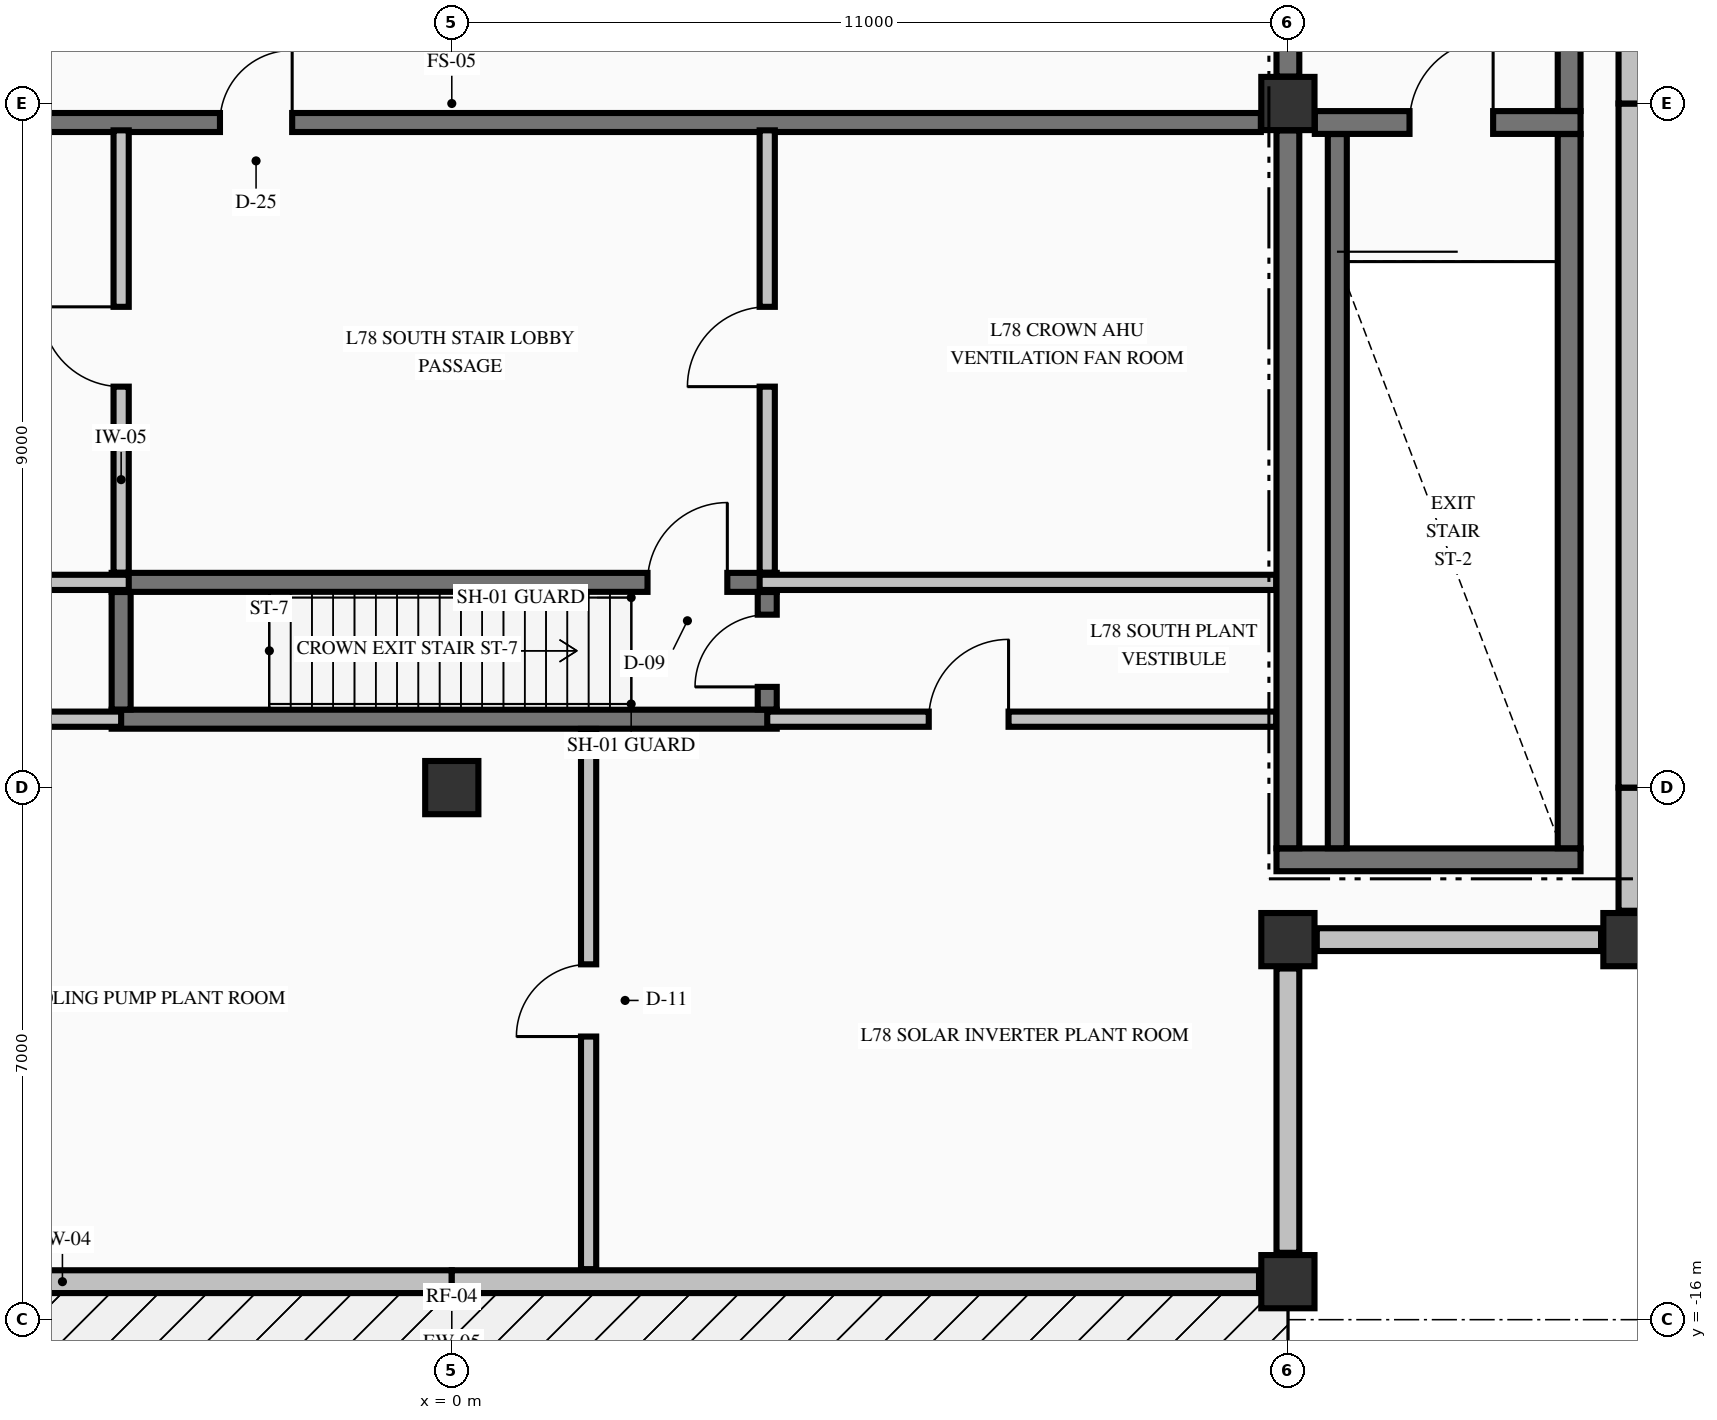
"""IFC4 building model, lengths in metres.
Left out: names, types, materials, properties, quantities, classifications, styles, units other than length and angle.
Written with IfcOpenShell. Run it as: python <this file> out.ifc"""

import sys

from ifc_helpers import new_model, si_unit, direction, frame, frame_2d, origin, origin_2d, place, context, subcontext, project, spatial, rectangle, extrude, element, fill, save


model = new_model("IFC4")
c1 = context("Model", 3, precision=1e-05, world=origin(), true_north=direction((0.0, 1.0)))
c2 = subcontext(c1, "Body", "Model", "MODEL_VIEW")
j1 = project(units=[si_unit("LENGTHUNIT", "METRE"), si_unit("PLANEANGLEUNIT", "RADIAN")], contexts=[c1])
p1 = place(None, origin())
s1 = spatial("IfcSite", under=j1, at=p1, CompositionType="ELEMENT")
p2 = place(p1, origin())
s2 = spatial("IfcBuilding", under=s1, at=p2, CompositionType="ELEMENT")
p3 = place(p2, frame((0.0, 0.0, 290.98)))
s3 = spatial("IfcBuildingStorey", under=s2, at=p3, CompositionType="ELEMENT", Elevation=290.98)
for number, where, z_axis, x_axis in (
    (1, (11.0, -15.5, -0.325), (0.0, 0.0, 1.0), (1.0, 0.0, 0.0)),
    (2, (15.5, -11.0, -0.325), (0.0, 0.0, 1.0), (1.0, 0.0, 0.0)),
    (3, (11.0, -11.0, -0.325), (0.0, 0.0, 1.0), (1.0, 0.0, 0.0)),
    (4, (11.0, 0.0, -0.325), (0.0, 0.0, 1.0), (1.0, 0.0, 0.0)),
    (5, (0.0, -9.0, -0.325), (0.0, 0.0, 1.0), (1.0, 0.0, 0.0)),
):
    element("IfcColumn", number, at=place(p3, frame(where, z_axis=z_axis, x_axis=x_axis)), inside=s3, PredefinedType="COLUMN", context=c2, shape_type="SweptSolid", body=[
        extrude(rectangle(XDim=0.7, YDim=0.7, at=origin_2d()), origin(), (0.0, 0.0, 1.0), 3.06),
    ])
for number, where, z_axis, x_axis in (
    (6, (-10.62, -15.5, 0.0), (0.0, 0.0, 1.0), (1.0, 0.0, 0.0)),
    (7, (0.0, -15.5, 0.0), (0.0, 0.0, 1.0), (1.0, 0.0, 0.0)),
):
    element("IfcWall", number, at=place(p3, frame(where, z_axis=z_axis, x_axis=x_axis)), inside=s3, PredefinedType="STANDARD", context=c2, shape_type="SweptSolid", body=[
        extrude(rectangle(XDim=10.62, YDim=0.3, at=frame_2d((5.31, 0.0))), origin(), (0.0, 0.0, 1.0), 2.127),
    ])
p4 = place(p3, frame((15.5, -10.62, 0.0), z_axis=(0.0, 0.0, 1.0), x_axis=(0.0, 1.0, 0.0)))
e8 = element("IfcWall", 8, at=p4, inside=s3, PredefinedType="STANDARD", context=c2, shape_type="SweptSolid", body=[
    extrude(rectangle(XDim=1.62, YDim=0.3, at=frame_2d((0.81, 0.0))), origin(), (0.0, 0.0, 1.0), 2.127),
])
for number, where, z_axis, x_axis in (
    (9, (15.5, -9.0, 0.0), (0.0, 0.0, 1.0), (0.0, 1.0, 0.0)),
    (10, (15.5, 0.0, 0.0), (0.0, 0.0, 1.0), (0.0, 1.0, 0.0)),
):
    element("IfcWall", number, at=place(p3, frame(where, z_axis=z_axis, x_axis=x_axis)), inside=s3, PredefinedType="STANDARD", context=c2, shape_type="SweptSolid", body=[
        extrude(rectangle(XDim=9.0, YDim=0.3, at=frame_2d((4.5, 0.0))), origin(), (0.0, 0.0, 1.0), 2.127),
    ])
p5 = place(p3, frame((11.0, -15.12, 0.0), z_axis=(0.0, 0.0, 1.0), x_axis=(0.0, 1.0, 0.0)))
e11 = element("IfcWall", 11, at=p5, inside=s3, PredefinedType="STANDARD", context=c2, shape_type="SweptSolid", body=[
    extrude(rectangle(XDim=3.74, YDim=0.3, at=frame_2d((1.87, 0.0))), origin(), (0.0, 0.0, 1.0), 0.927),
])
p6 = place(p3, frame((11.38, -11.0, 0.0), z_axis=(0.0, 0.0, 1.0), x_axis=(1.0, 0.0, 0.0)))
e12 = element("IfcWall", 12, at=p6, inside=s3, PredefinedType="STANDARD", context=c2, shape_type="SweptSolid", body=[
    extrude(rectangle(XDim=3.74, YDim=0.3, at=frame_2d((1.87, 0.0))), origin(), (0.0, 0.0, 1.0), 1.077),
])
p7 = place(p3, frame((10.85, -9.95, 0.0), z_axis=(0.0, 0.0, 1.0), x_axis=(1.0, 0.0, 0.0)))
e13 = element("IfcWall", 13, at=p7, inside=s3, PredefinedType="SHEAR", context=c2, shape_type="SweptSolid", body=[
    extrude(rectangle(XDim=4.0, YDim=0.3, at=frame_2d((2.0, 0.0))), origin(), (0.0, 0.0, 1.0), 2.735),
])
p8 = place(p3, frame((-4.475, -8.1, 0.0), z_axis=(0.0, 0.0, 1.0), x_axis=(1.0, 0.0, 0.0)))
e14 = element("IfcWall", 14, at=p8, inside=s3, PredefinedType="SOLIDWALL", context=c2, shape_type="SweptSolid", body=[
    extrude(rectangle(XDim=8.75, YDim=0.25, at=frame_2d((4.375, 0.0))), origin(), (0.0, 0.0, 1.0), 2.735),
])
p9 = place(p3, frame((-4.475, -6.3, 0.0), z_axis=(0.0, 0.0, 1.0), x_axis=(1.0, 0.0, 0.0)))
e15 = element("IfcWall", 15, at=p9, inside=s3, PredefinedType="SOLIDWALL", context=c2, shape_type="SweptSolid", body=[
    extrude(rectangle(XDim=8.75, YDim=0.25, at=frame_2d((4.375, 0.0))), origin(), (0.0, 0.0, 1.0), 2.735),
])
p10 = place(p9, frame((7.05, 0.0, 0.0)))
e16 = element("IfcOpeningElement", 16, at=p10, cuts=e15, PredefinedType="OPENING", context=c2, shape_type="SweptSolid", body=[
    extrude(rectangle(XDim=1.05, YDim=2.15, at=frame_2d((0.525, 1.075))), frame((0.0, 0.135, 0.0), z_axis=(0.0, -1.0, 0.0), x_axis=(1.0, 0.0, 0.0)), (0.0, 0.0, 1.0), 0.27),
])
p11 = place(p3, frame((11.354, -0.25, 0.0), z_axis=(0.0, 0.0, 1.0), x_axis=(1.0, 0.0, 0.0)))
e17 = element("IfcWall", 17, at=p11, inside=s3, PredefinedType="SHEAR", context=c2, shape_type="SweptSolid", body=[
    extrude(rectangle(XDim=3.496, YDim=0.3, at=frame_2d((1.748, 0.0))), origin(), (0.0, 0.0, 1.0), 2.735),
])
p12 = place(p11, frame((1.246, 0.0, 0.0)))
e18 = element("IfcOpeningElement", 18, at=p12, cuts=e17, PredefinedType="OPENING", context=c2, shape_type="SweptSolid", body=[
    extrude(rectangle(XDim=1.1, YDim=2.15, at=frame_2d((0.55, 1.075))), frame((0.0, 0.16, 0.0), z_axis=(0.0, -1.0, 0.0), x_axis=(1.0, 0.0, 0.0)), (0.0, 0.0, 1.0), 0.32),
])
p13 = place(p3, frame((-10.847, -8.1, 0.0), z_axis=(0.0, 0.0, 1.0), x_axis=(1.0, 0.0, 0.0)))
e19 = element("IfcWall", 19, at=p13, inside=s3, PredefinedType="PARTITIONING", context=c2, shape_type="SweptSolid", body=[
    extrude(rectangle(XDim=6.497, YDim=0.2, at=frame_2d((3.249, 0.0))), origin(), (0.0, 0.0, 1.0), 2.735),
])
p14 = place(p3, frame((4.15, -8.1, 0.0), z_axis=(0.0, 0.0, 1.0), x_axis=(1.0, 0.0, 0.0)))
e20 = element("IfcWall", 20, at=p14, inside=s3, PredefinedType="PARTITIONING", context=c2, shape_type="SweptSolid", body=[
    extrude(rectangle(XDim=6.697, YDim=0.2, at=frame_2d((3.349, 0.0))), origin(), (0.0, 0.0, 1.0), 2.735),
])
p15 = place(p14, frame((2.125, 0.0, 0.0)))
e21 = element("IfcOpeningElement", 21, at=p15, cuts=e20, PredefinedType="OPENING", context=c2, shape_type="SweptSolid", body=[
    extrude(rectangle(XDim=1.05, YDim=2.15, at=frame_2d((0.525, 1.075))), frame((0.0, 0.11, 0.0), z_axis=(0.0, -1.0, 0.0), x_axis=(1.0, 0.0, 0.0)), (0.0, 0.0, 1.0), 0.22),
])
p16 = place(p3, frame((-10.847, -6.3, 0.0), z_axis=(0.0, 0.0, 1.0), x_axis=(1.0, 0.0, 0.0)))
e22 = element("IfcWall", 22, at=p16, inside=s3, PredefinedType="PARTITIONING", context=c2, shape_type="SweptSolid", body=[
    extrude(rectangle(XDim=6.597, YDim=0.2, at=frame_2d((3.298, 0.0))), origin(), (0.0, 0.0, 1.0), 2.735),
])
p17 = place(p3, frame((4.05, -6.3, 0.0), z_axis=(0.0, 0.0, 1.0), x_axis=(1.0, 0.0, 0.0)))
e23 = element("IfcWall", 23, at=p17, inside=s3, PredefinedType="PARTITIONING", context=c2, shape_type="SweptSolid", body=[
    extrude(rectangle(XDim=6.797, YDim=0.2, at=frame_2d((3.398, 0.0))), origin(), (0.0, 0.0, 1.0), 2.735),
])
p18 = place(p3, frame((-10.644, -0.25, 0.0), z_axis=(0.0, 0.0, 1.0), x_axis=(1.0, 0.0, 0.0)))
e24 = element("IfcWall", 24, at=p18, inside=s3, PredefinedType="SOLIDWALL", context=c2, shape_type="SweptSolid", body=[
    extrude(rectangle(XDim=21.288, YDim=0.25, at=frame_2d((10.644, 0.0))), origin(), (0.0, 0.0, 1.0), 2.735),
])
p19 = place(p18, frame((7.594, 0.0, 0.0)))
e25 = element("IfcOpeningElement", 25, at=p19, cuts=e24, PredefinedType="OPENING", context=c2, shape_type="SweptSolid", body=[
    extrude(rectangle(XDim=0.95, YDim=2.02, at=frame_2d((0.475, 1.01))), frame((0.0, 0.135, 0.0), z_axis=(0.0, -1.0, 0.0), x_axis=(1.0, 0.0, 0.0)), (0.0, 0.0, 1.0), 0.27),
])
p20 = place(p3, frame((-4.35, -7.973, 0.0), z_axis=(0.0, 0.0, 1.0), x_axis=(0.0, 1.0, 0.0)))
e26 = element("IfcWall", 26, at=p20, inside=s3, PredefinedType="SOLIDWALL", context=c2, shape_type="SweptSolid", body=[
    extrude(rectangle(XDim=1.546, YDim=0.25, at=frame_2d((0.773, 0.0))), origin(), (0.0, 0.0, 1.0), 2.735),
])
p21 = place(p3, frame((4.15, -7.973, 0.0), z_axis=(0.0, 0.0, 1.0), x_axis=(0.0, 1.0, 0.0)))
e27 = element("IfcWall", 27, at=p21, inside=s3, PredefinedType="SOLIDWALL", context=c2, shape_type="SweptSolid", body=[
    extrude(rectangle(XDim=1.546, YDim=0.25, at=frame_2d((0.773, 0.0))), origin(), (0.0, 0.0, 1.0), 2.735),
])
p22 = place(p21, frame((0.298, 0.0, 0.0)))
e28 = element("IfcOpeningElement", 28, at=p22, cuts=e27, PredefinedType="OPENING", context=c2, shape_type="SweptSolid", body=[
    extrude(rectangle(XDim=0.95, YDim=2.15, at=frame_2d((0.475, 1.075))), frame((0.0, 0.135, 0.0), z_axis=(0.0, -1.0, 0.0), x_axis=(1.0, 0.0, 0.0)), (0.0, 0.0, 1.0), 0.27),
])
p23 = place(p3, frame((11.0, -9.798, 0.0), z_axis=(0.0, 0.0, 1.0), x_axis=(0.0, 1.0, 0.0)))
e29 = element("IfcWall", 29, at=p23, inside=s3, PredefinedType="SHEAR", context=c2, shape_type="SweptSolid", body=[
    extrude(rectangle(XDim=9.444, YDim=0.3, at=frame_2d((4.722, 0.0))), origin(), (0.0, 0.0, 1.0), 2.735),
])
p24 = place(p3, frame((11.0, 0.354, 0.0), z_axis=(0.0, 0.0, 1.0), x_axis=(0.0, 1.0, 0.0)))
e30 = element("IfcWall", 30, at=p24, inside=s3, PredefinedType="SHEAR", context=c2, shape_type="SweptSolid", body=[
    extrude(rectangle(XDim=2.394, YDim=0.3, at=frame_2d((1.197, 0.0))), origin(), (0.0, 0.0, 1.0), 2.735),
])
p25 = place(p24, frame((0.746, 0.0, 0.0)))
e31 = element("IfcOpeningElement", 31, at=p25, cuts=e30, PredefinedType="OPENING", context=c2, shape_type="SweptSolid", body=[
    extrude(rectangle(XDim=1.1, YDim=2.15, at=frame_2d((0.55, 1.075))), frame((0.0, 0.16, 0.0), z_axis=(0.0, -1.0, 0.0), x_axis=(1.0, 0.0, 0.0)), (0.0, 0.0, 1.0), 0.32),
])
p26 = place(p3, frame((11.65, -9.798, 0.0), z_axis=(0.0, 0.0, 1.0), x_axis=(0.0, 1.0, 0.0)))
e32 = element("IfcWall", 32, at=p26, inside=s3, PredefinedType="SOLIDWALL", context=c2, shape_type="SweptSolid", body=[
    extrude(rectangle(XDim=9.396, YDim=0.25, at=frame_2d((4.698, 0.0))), origin(), (0.0, 0.0, 1.0), 2.735),
])
p27 = place(p3, frame((14.7, -9.798, 0.0), z_axis=(0.0, 0.0, 1.0), x_axis=(0.0, 1.0, 0.0)))
e33 = element("IfcWall", 33, at=p27, inside=s3, PredefinedType="SHEAR", context=c2, shape_type="SweptSolid", body=[
    extrude(rectangle(XDim=9.396, YDim=0.3, at=frame_2d((4.698, 0.0))), origin(), (0.0, 0.0, 1.0), 2.735),
])
p28 = place(p3, frame((14.7, -0.098, 0.0), z_axis=(0.0, 0.0, 1.0), x_axis=(0.0, 1.0, 0.0)))
e34 = element("IfcWall", 34, at=p28, inside=s3, PredefinedType="SHEAR", context=c2, shape_type="SweptSolid", body=[
    extrude(rectangle(XDim=2.846, YDim=0.3, at=frame_2d((1.423, 0.0))), origin(), (0.0, 0.0, 1.0), 2.735),
])
p29 = place(p3, frame((-4.35, -6.172, 0.0), z_axis=(0.0, 0.0, 1.0), x_axis=(0.0, 1.0, 0.0)))
e35 = element("IfcWall", 35, at=p29, inside=s3, PredefinedType="PARTITIONING", context=c2, shape_type="SweptSolid", body=[
    extrude(rectangle(XDim=5.819, YDim=0.2, at=frame_2d((2.91, 0.0))), origin(), (0.0, 0.0, 1.0), 2.735),
])
p30 = place(p29, frame((2.447, 0.0, 0.0)))
e36 = element("IfcOpeningElement", 36, at=p30, cuts=e35, PredefinedType="OPENING", context=c2, shape_type="SweptSolid", body=[
    extrude(rectangle(XDim=1.05, YDim=2.15, at=frame_2d((0.525, 1.075))), frame((0.0, 0.11, 0.0), z_axis=(0.0, -1.0, 0.0), x_axis=(1.0, 0.0, 0.0)), (0.0, 0.0, 1.0), 0.22),
])
p31 = place(p3, frame((1.8, -15.335, 0.0), z_axis=(0.0, 0.0, 1.0), x_axis=(0.0, 1.0, 0.0)))
e37 = element("IfcWall", 37, at=p31, inside=s3, PredefinedType="PARTITIONING", context=c2, shape_type="SweptSolid", body=[
    extrude(rectangle(XDim=7.107, YDim=0.2, at=frame_2d((3.553, 0.0))), origin(), (0.0, 0.0, 1.0), 2.735),
])
p32 = place(p31, frame((3.06, 0.0, 0.0)))
e38 = element("IfcOpeningElement", 38, at=p32, cuts=e37, PredefinedType="OPENING", context=c2, shape_type="SweptSolid", body=[
    extrude(rectangle(XDim=0.95, YDim=2.15, at=frame_2d((0.475, 1.075))), frame((0.0, 0.11, 0.0), z_axis=(0.0, -1.0, 0.0), x_axis=(1.0, 0.0, 0.0)), (0.0, 0.0, 1.0), 0.22),
])
p33 = place(p3, frame((4.15, -6.172, 0.0), z_axis=(0.0, 0.0, 1.0), x_axis=(0.0, 1.0, 0.0)))
e39 = element("IfcWall", 39, at=p33, inside=s3, PredefinedType="PARTITIONING", context=c2, shape_type="SweptSolid", body=[
    extrude(rectangle(XDim=5.819, YDim=0.2, at=frame_2d((2.91, 0.0))), origin(), (0.0, 0.0, 1.0), 2.735),
])
p34 = place(p33, frame((2.447, 0.0, 0.0)))
e40 = element("IfcOpeningElement", 40, at=p34, cuts=e39, PredefinedType="OPENING", context=c2, shape_type="SweptSolid", body=[
    extrude(rectangle(XDim=1.05, YDim=2.15, at=frame_2d((0.525, 1.075))), frame((0.0, 0.11, 0.0), z_axis=(0.0, -1.0, 0.0), x_axis=(1.0, 0.0, 0.0)), (0.0, 0.0, 1.0), 0.22),
])
p35 = place(p12, origin())
e41 = element("IfcDoor", 41, at=p35, inside=s3, OperationType="SINGLE_SWING_RIGHT", PredefinedType="DOOR", context=c2, shape_type="SweptSolid", body=[
    extrude(rectangle(XDim=1.1, YDim=2.15, at=frame_2d((0.55, 1.075))), frame((0.0, 0.025, 0.0), z_axis=(0.0, -1.0, 0.0), x_axis=(1.0, 0.0, 0.0)), (0.0, 0.0, 1.0), 0.05),
])
fill(e18, e41)
p36 = place(p10, origin())
e42 = element("IfcDoor", 42, at=p36, inside=s3, OperationType="SINGLE_SWING_RIGHT", PredefinedType="DOOR", context=c2, shape_type="SweptSolid", body=[
    extrude(rectangle(XDim=1.05, YDim=2.15, at=frame_2d((0.525, 1.075))), frame((0.0, 0.025, 0.0), z_axis=(0.0, -1.0, 0.0), x_axis=(1.0, 0.0, 0.0)), (0.0, 0.0, 1.0), 0.05),
])
fill(e16, e42)
p37 = place(p19, origin())
e43 = element("IfcDoor", 43, at=p37, inside=s3, OperationType="SINGLE_SWING_RIGHT", PredefinedType="DOOR", context=c2, shape_type="SweptSolid", body=[
    extrude(rectangle(XDim=0.95, YDim=2.02, at=frame_2d((0.475, 1.01))), frame((0.0, 0.025, 0.0), z_axis=(0.0, -1.0, 0.0), x_axis=(1.0, 0.0, 0.0)), (0.0, 0.0, 1.0), 0.05),
])
fill(e25, e43)
p38 = place(p30, origin())
e44 = element("IfcDoor", 44, at=p38, inside=s3, OperationType="SINGLE_SWING_RIGHT", PredefinedType="DOOR", context=c2, shape_type="SweptSolid", body=[
    extrude(rectangle(XDim=1.05, YDim=2.15, at=frame_2d((0.525, 1.075))), frame((0.0, 0.025, 0.0), z_axis=(0.0, -1.0, 0.0), x_axis=(1.0, 0.0, 0.0)), (0.0, 0.0, 1.0), 0.05),
])
fill(e36, e44)
p39 = place(p34, origin())
e45 = element("IfcDoor", 45, at=p39, inside=s3, OperationType="SINGLE_SWING_LEFT", PredefinedType="DOOR", context=c2, shape_type="SweptSolid", body=[
    extrude(rectangle(XDim=1.05, YDim=2.15, at=frame_2d((0.525, 1.075))), frame((0.0, 0.025, 0.0), z_axis=(0.0, -1.0, 0.0), x_axis=(1.0, 0.0, 0.0)), (0.0, 0.0, 1.0), 0.05),
])
fill(e40, e45)
p40 = place(p32, origin())
e46 = element("IfcDoor", 46, at=p40, inside=s3, OperationType="SINGLE_SWING_LEFT", PredefinedType="DOOR", context=c2, shape_type="SweptSolid", body=[
    extrude(rectangle(XDim=0.95, YDim=2.15, at=frame_2d((0.475, 1.075))), frame((0.0, 0.025, 0.0), z_axis=(0.0, -1.0, 0.0), x_axis=(1.0, 0.0, 0.0)), (0.0, 0.0, 1.0), 0.05),
])
fill(e38, e46)
p41 = place(p22, origin())
e47 = element("IfcDoor", 47, at=p41, inside=s3, OperationType="SINGLE_SWING_LEFT", PredefinedType="DOOR", context=c2, shape_type="SweptSolid", body=[
    extrude(rectangle(XDim=0.95, YDim=2.15, at=frame_2d((0.475, 1.075))), frame((0.0, 0.025, 0.0), z_axis=(0.0, -1.0, 0.0), x_axis=(1.0, 0.0, 0.0)), (0.0, 0.0, 1.0), 0.05),
])
fill(e28, e47)
p42 = place(p15, origin())
e48 = element("IfcDoor", 48, at=p42, inside=s3, OperationType="SINGLE_SWING_RIGHT", PredefinedType="DOOR", context=c2, shape_type="SweptSolid", body=[
    extrude(rectangle(XDim=1.05, YDim=2.15, at=frame_2d((0.525, 1.075))), frame((0.0, 0.025, 0.0), z_axis=(0.0, -1.0, 0.0), x_axis=(1.0, 0.0, 0.0)), (0.0, 0.0, 1.0), 0.05),
])
fill(e21, e48)
save(model, sys.argv[1])
